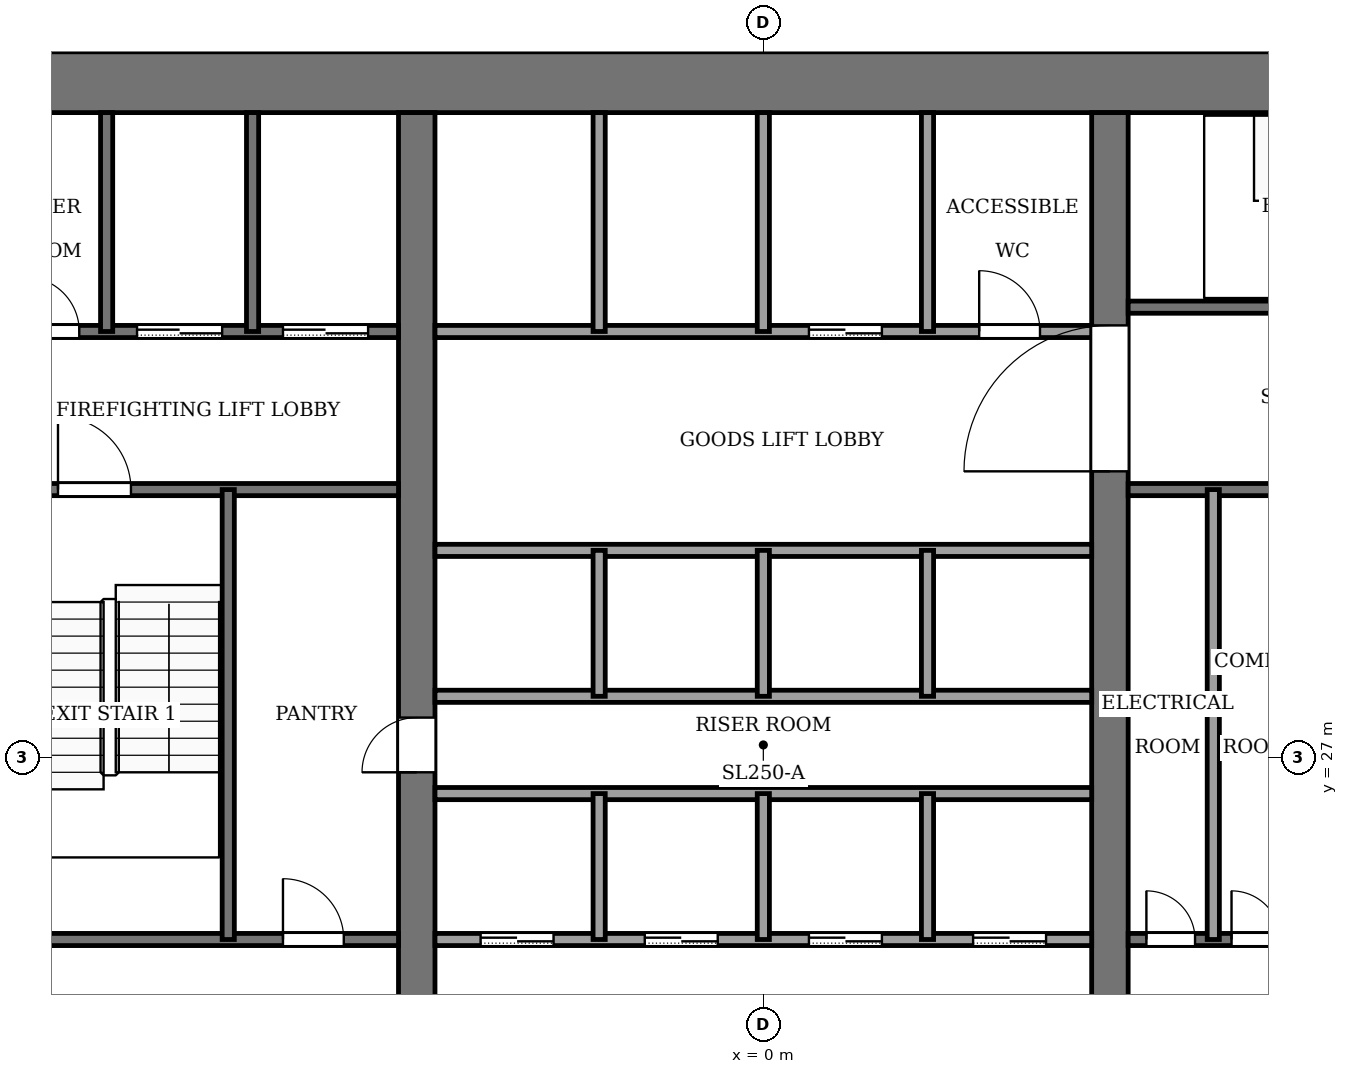
"""IFC4 building model, lengths in metres.
Left out: names, types, materials, properties, quantities, classifications, styles, units other than length and angle.
Written with IfcOpenShell. Run it as: python <this file> out.ifc"""

import sys

from ifc_helpers import new_model, si_unit, direction, frame, frame_2d, origin, place, context, subcontext, project, spatial, rectangle, extrude, element, fill, save


model = new_model("IFC4")
c1 = context("Model", 3, precision=1e-05, world=origin(), true_north=direction((0.0, 1.0)))
c2 = subcontext(c1, "Body", "Model", "MODEL_VIEW")
j1 = project(units=[si_unit("LENGTHUNIT", "METRE"), si_unit("PLANEANGLEUNIT", "RADIAN")], contexts=[c1])
p1 = place(None, origin())
s1 = spatial("IfcSite", under=j1, at=p1, CompositionType="ELEMENT")
p2 = place(p1, origin())
s2 = spatial("IfcBuilding", under=s1, at=p2, CompositionType="ELEMENT")
p3 = place(p2, frame((0.0, 0.0, 142.0)))
s3 = spatial("IfcBuildingStorey", under=s2, at=p3, CompositionType="ELEMENT", Elevation=142.0)
p4 = place(p3, frame((-13.6, 38.1, -0.13), z_axis=(0.0, 0.0, 1.0), x_axis=(1.0, 0.0, 0.0)))
e1 = element("IfcWall", 1, at=p4, inside=s3, PredefinedType="SHEAR", context=c2, shape_type="SweptSolid", body=[
    extrude(rectangle(XDim=27.2, YDim=1.0, at=frame_2d((13.6, 0.0))), origin(), (0.0, 0.0, 1.0), 4.0),
])
p5 = place(p3, frame((-5.7, 18.4, -0.13), z_axis=(0.0, 0.0, 1.0), x_axis=(0.0, 1.0, 0.0)))
e2 = element("IfcWall", 2, at=p5, inside=s3, PredefinedType="SHEAR", context=c2, shape_type="SweptSolid", body=[
    extrude(rectangle(XDim=19.2, YDim=0.6, at=frame_2d((9.6, 0.0))), origin(), (0.0, 0.0, 1.0), 4.0),
])
p6 = place(p5, frame((8.35, 0.0, 0.13)))
e3 = element("IfcOpeningElement", 3, at=p6, cuts=e2, PredefinedType="OPENING", context=c2, shape_type="SweptSolid", body=[
    extrude(rectangle(XDim=0.9, YDim=2.1, at=frame_2d((0.45, 1.05))), frame((0.0, 0.31, 0.0), z_axis=(0.0, -1.0, 0.0), x_axis=(1.0, 0.0, 0.0)), (0.0, 0.0, 1.0), 0.62),
])
p7 = place(p3, frame((5.7, 18.4, -0.13), z_axis=(0.0, 0.0, 1.0), x_axis=(0.0, 1.0, 0.0)))
e4 = element("IfcWall", 4, at=p7, inside=s3, PredefinedType="SHEAR", context=c2, shape_type="SweptSolid", body=[
    extrude(rectangle(XDim=19.2, YDim=0.6, at=frame_2d((9.6, 0.0))), origin(), (0.0, 0.0, 1.0), 4.0),
])
p8 = place(p7, frame((13.3, 0.0, 0.13)))
e5 = element("IfcOpeningElement", 5, at=p8, cuts=e4, PredefinedType="OPENING", context=c2, shape_type="SweptSolid", body=[
    extrude(rectangle(XDim=2.4, YDim=2.4, at=frame_2d((1.2, 1.2))), frame((0.0, 0.31, 0.0), z_axis=(0.0, -1.0, 0.0), x_axis=(1.0, 0.0, 0.0)), (0.0, 0.0, 1.0), 0.62),
])
p9 = place(p3, frame((-12.6, 24.0, 0.0), z_axis=(0.0, 0.0, 1.0), x_axis=(1.0, 0.0, 0.0)))
e6 = element("IfcWall", 6, at=p9, inside=s3, PredefinedType="PARTITIONING", context=c2, shape_type="SweptSolid", body=[
    extrude(rectangle(XDim=6.6, YDim=0.2, at=frame_2d((3.3, 0.0))), origin(), (0.0, 0.0, 1.0), 3.87),
])
p10 = place(p9, frame((4.7, 0.0, 0.0)))
e7 = element("IfcOpeningElement", 7, at=p10, cuts=e6, PredefinedType="OPENING", context=c2, shape_type="SweptSolid", body=[
    extrude(rectangle(XDim=1.0, YDim=2.1, at=frame_2d((0.5, 1.05))), frame((0.0, 0.11, 0.0), z_axis=(0.0, -1.0, 0.0), x_axis=(1.0, 0.0, 0.0)), (0.0, 0.0, 1.0), 0.22),
])
p11 = place(p3, frame((-5.4, 24.0, 0.0), z_axis=(0.0, 0.0, 1.0), x_axis=(1.0, 0.0, 0.0)))
e8 = element("IfcWall", 8, at=p11, inside=s3, PredefinedType="PARTITIONING", context=c2, shape_type="SweptSolid", body=[
    extrude(rectangle(XDim=10.8, YDim=0.2, at=frame_2d((5.4, 0.0))), origin(), (0.0, 0.0, 1.0), 3.87),
])
p12 = place(p11, frame((0.75, 0.0, 0.0)))
e9 = element("IfcOpeningElement", 9, at=p12, cuts=e8, PredefinedType="OPENING", context=c2, shape_type="SweptSolid", body=[
    extrude(rectangle(XDim=1.2, YDim=2.2, at=frame_2d((0.6, 1.1))), frame((0.0, 0.11, 0.0), z_axis=(0.0, -1.0, 0.0), x_axis=(1.0, 0.0, 0.0)), (0.0, 0.0, 1.0), 0.22),
])
p13 = place(p11, frame((3.45, 0.0, 0.0)))
e10 = element("IfcOpeningElement", 10, at=p13, cuts=e8, PredefinedType="OPENING", context=c2, shape_type="SweptSolid", body=[
    extrude(rectangle(XDim=1.2, YDim=2.2, at=frame_2d((0.6, 1.1))), frame((0.0, 0.11, 0.0), z_axis=(0.0, -1.0, 0.0), x_axis=(1.0, 0.0, 0.0)), (0.0, 0.0, 1.0), 0.22),
])
p14 = place(p11, frame((6.15, 0.0, 0.0)))
e11 = element("IfcOpeningElement", 11, at=p14, cuts=e8, PredefinedType="OPENING", context=c2, shape_type="SweptSolid", body=[
    extrude(rectangle(XDim=1.2, YDim=2.2, at=frame_2d((0.6, 1.1))), frame((0.0, 0.11, 0.0), z_axis=(0.0, -1.0, 0.0), x_axis=(1.0, 0.0, 0.0)), (0.0, 0.0, 1.0), 0.22),
])
p15 = place(p11, frame((8.85, 0.0, 0.0)))
e12 = element("IfcOpeningElement", 12, at=p15, cuts=e8, PredefinedType="OPENING", context=c2, shape_type="SweptSolid", body=[
    extrude(rectangle(XDim=1.2, YDim=2.2, at=frame_2d((0.6, 1.1))), frame((0.0, 0.11, 0.0), z_axis=(0.0, -1.0, 0.0), x_axis=(1.0, 0.0, 0.0)), (0.0, 0.0, 1.0), 0.22),
])
p16 = place(p3, frame((6.0, 24.0, 0.0), z_axis=(0.0, 0.0, 1.0), x_axis=(1.0, 0.0, 0.0)))
e13 = element("IfcWall", 13, at=p16, inside=s3, PredefinedType="PARTITIONING", context=c2, shape_type="SweptSolid", body=[
    extrude(rectangle(XDim=6.6, YDim=0.2, at=frame_2d((3.3, 0.0))), origin(), (0.0, 0.0, 1.0), 3.87),
])
p17 = place(p16, frame((0.3, 0.0, 0.0)))
e14 = element("IfcOpeningElement", 14, at=p17, cuts=e13, PredefinedType="OPENING", context=c2, shape_type="SweptSolid", body=[
    extrude(rectangle(XDim=0.8, YDim=2.1, at=frame_2d((0.4, 1.05))), frame((0.0, 0.11, 0.0), z_axis=(0.0, -1.0, 0.0), x_axis=(1.0, 0.0, 0.0)), (0.0, 0.0, 1.0), 0.22),
])
p18 = place(p16, frame((1.7, 0.0, 0.0)))
e15 = element("IfcOpeningElement", 15, at=p18, cuts=e13, PredefinedType="OPENING", context=c2, shape_type="SweptSolid", body=[
    extrude(rectangle(XDim=0.8, YDim=2.1, at=frame_2d((0.4, 1.05))), frame((0.0, 0.11, 0.0), z_axis=(0.0, -1.0, 0.0), x_axis=(1.0, 0.0, 0.0)), (0.0, 0.0, 1.0), 0.22),
])
p19 = place(p16, frame((4.4, 0.0, 0.0)))
e16 = element("IfcOpeningElement", 16, at=p19, cuts=e13, PredefinedType="OPENING", context=c2, shape_type="SweptSolid", body=[
    extrude(rectangle(XDim=1.2, YDim=2.2, at=frame_2d((0.6, 1.1))), frame((0.0, 0.11, 0.0), z_axis=(0.0, -1.0, 0.0), x_axis=(1.0, 0.0, 0.0)), (0.0, 0.0, 1.0), 0.22),
])
for number, where, z_axis, x_axis in (
    (17, (-5.4, 26.4, 0.0), (0.0, 0.0, 1.0), (1.0, 0.0, 0.0)),
    (18, (-5.4, 28.0, 0.0), (0.0, 0.0, 1.0), (1.0, 0.0, 0.0)),
    (19, (-5.4, 30.4, 0.0), (0.0, 0.0, 1.0), (1.0, 0.0, 0.0)),
):
    element("IfcWall", number, at=place(p3, frame(where, z_axis=z_axis, x_axis=x_axis)), inside=s3, PredefinedType="PARTITIONING", context=c2, shape_type="SweptSolid", body=[
        extrude(rectangle(XDim=10.8, YDim=0.2, at=frame_2d((5.4, 0.0))), origin(), (0.0, 0.0, 1.0), 3.87),
    ])
p20 = place(p3, frame((-12.6, 31.4, 0.0), z_axis=(0.0, 0.0, 1.0), x_axis=(1.0, 0.0, 0.0)))
e20 = element("IfcWall", 20, at=p20, inside=s3, PredefinedType="PARTITIONING", context=c2, shape_type="SweptSolid", body=[
    extrude(rectangle(XDim=6.6, YDim=0.2, at=frame_2d((3.3, 0.0))), origin(), (0.0, 0.0, 1.0), 3.87),
])
p21 = place(p20, frame((1.0, 0.0, 0.0)))
e21 = element("IfcOpeningElement", 21, at=p21, cuts=e20, PredefinedType="OPENING", context=c2, shape_type="SweptSolid", body=[
    extrude(rectangle(XDim=1.2, YDim=2.2, at=frame_2d((0.6, 1.1))), frame((0.0, 0.11, 0.0), z_axis=(0.0, -1.0, 0.0), x_axis=(1.0, 0.0, 0.0)), (0.0, 0.0, 1.0), 0.22),
])
p22 = place(p3, frame((6.0, 31.4, 0.0), z_axis=(0.0, 0.0, 1.0), x_axis=(1.0, 0.0, 0.0)))
e22 = element("IfcWall", 22, at=p22, inside=s3, PredefinedType="PARTITIONING", context=c2, shape_type="SweptSolid", body=[
    extrude(rectangle(XDim=6.6, YDim=0.2, at=frame_2d((3.3, 0.0))), origin(), (0.0, 0.0, 1.0), 3.87),
])
p23 = place(p3, frame((-12.6, 34.0, 0.0), z_axis=(0.0, 0.0, 1.0), x_axis=(1.0, 0.0, 0.0)))
e23 = element("IfcWall", 23, at=p23, inside=s3, PredefinedType="PARTITIONING", context=c2, shape_type="SweptSolid", body=[
    extrude(rectangle(XDim=6.6, YDim=0.2, at=frame_2d((3.3, 0.0))), origin(), (0.0, 0.0, 1.0), 3.87),
])
p24 = place(p23, frame((4.7, 0.0, 0.0)))
e24 = element("IfcOpeningElement", 24, at=p24, cuts=e23, PredefinedType="OPENING", context=c2, shape_type="SweptSolid", body=[
    extrude(rectangle(XDim=1.4, YDim=2.2, at=frame_2d((0.7, 1.1))), frame((0.0, 0.11, 0.0), z_axis=(0.0, -1.0, 0.0), x_axis=(1.0, 0.0, 0.0)), (0.0, 0.0, 1.0), 0.22),
])
p25 = place(p23, frame((2.3, 0.0, 0.0)))
e25 = element("IfcOpeningElement", 25, at=p25, cuts=e23, PredefinedType="OPENING", context=c2, shape_type="SweptSolid", body=[
    extrude(rectangle(XDim=1.4, YDim=2.2, at=frame_2d((0.7, 1.1))), frame((0.0, 0.11, 0.0), z_axis=(0.0, -1.0, 0.0), x_axis=(1.0, 0.0, 0.0)), (0.0, 0.0, 1.0), 0.22),
])
p26 = place(p23, frame((0.45, 0.0, 0.0)))
e26 = element("IfcOpeningElement", 26, at=p26, cuts=e23, PredefinedType="OPENING", context=c2, shape_type="SweptSolid", body=[
    extrude(rectangle(XDim=0.9, YDim=2.1, at=frame_2d((0.45, 1.05))), frame((0.0, 0.11, 0.0), z_axis=(0.0, -1.0, 0.0), x_axis=(1.0, 0.0, 0.0)), (0.0, 0.0, 1.0), 0.22),
])
p27 = place(p3, frame((-5.4, 34.0, 0.0), z_axis=(0.0, 0.0, 1.0), x_axis=(1.0, 0.0, 0.0)))
e27 = element("IfcWall", 27, at=p27, inside=s3, PredefinedType="PARTITIONING", context=c2, shape_type="SweptSolid", body=[
    extrude(rectangle(XDim=10.8, YDim=0.2, at=frame_2d((5.4, 0.0))), origin(), (0.0, 0.0, 1.0), 3.87),
])
p28 = place(p27, frame((6.15, 0.0, 0.0)))
e28 = element("IfcOpeningElement", 28, at=p28, cuts=e27, PredefinedType="OPENING", context=c2, shape_type="SweptSolid", body=[
    extrude(rectangle(XDim=1.2, YDim=2.2, at=frame_2d((0.6, 1.1))), frame((0.0, 0.11, 0.0), z_axis=(0.0, -1.0, 0.0), x_axis=(1.0, 0.0, 0.0)), (0.0, 0.0, 1.0), 0.22),
])
p29 = place(p27, frame((8.95, 0.0, 0.0)))
e29 = element("IfcOpeningElement", 29, at=p29, cuts=e27, PredefinedType="OPENING", context=c2, shape_type="SweptSolid", body=[
    extrude(rectangle(XDim=1.0, YDim=2.1, at=frame_2d((0.5, 1.05))), frame((0.0, 0.11, 0.0), z_axis=(0.0, -1.0, 0.0), x_axis=(1.0, 0.0, 0.0)), (0.0, 0.0, 1.0), 0.22),
])
p30 = place(p3, frame((6.0, 34.4, 0.0), z_axis=(0.0, 0.0, 1.0), x_axis=(1.0, 0.0, 0.0)))
e30 = element("IfcWall", 30, at=p30, inside=s3, PredefinedType="PARTITIONING", context=c2, shape_type="SweptSolid", body=[
    extrude(rectangle(XDim=6.6, YDim=0.2, at=frame_2d((3.3, 0.0))), origin(), (0.0, 0.0, 1.0), 3.87),
])
p31 = place(p30, frame((4.8, 0.0, 0.0)))
e31 = element("IfcOpeningElement", 31, at=p31, cuts=e30, PredefinedType="OPENING", context=c2, shape_type="SweptSolid", body=[
    extrude(rectangle(XDim=1.2, YDim=2.2, at=frame_2d((0.6, 1.1))), frame((0.0, 0.11, 0.0), z_axis=(0.0, -1.0, 0.0), x_axis=(1.0, 0.0, 0.0)), (0.0, 0.0, 1.0), 0.22),
])
p32 = place(p3, frame((-10.8, 34.0, 0.0), z_axis=(0.0, 0.0, 1.0), x_axis=(0.0, 1.0, 0.0)))
e32 = element("IfcWall", 32, at=p32, inside=s3, PredefinedType="PARTITIONING", context=c2, shape_type="SweptSolid", body=[
    extrude(rectangle(XDim=3.6, YDim=0.2, at=frame_2d((1.8, 0.0))), origin(), (0.0, 0.0, 1.0), 3.87),
])
p33 = place(p3, frame((-8.8, 24.0, 0.0), z_axis=(0.0, 0.0, 1.0), x_axis=(0.0, 1.0, 0.0)))
e33 = element("IfcWall", 33, at=p33, inside=s3, PredefinedType="PARTITIONING", context=c2, shape_type="SweptSolid", body=[
    extrude(rectangle(XDim=7.4, YDim=0.2, at=frame_2d((3.7, 0.0))), origin(), (0.0, 0.0, 1.0), 3.87),
])
p34 = place(p3, frame((-8.4, 34.0, 0.0), z_axis=(0.0, 0.0, 1.0), x_axis=(0.0, 1.0, 0.0)))
e34 = element("IfcWall", 34, at=p34, inside=s3, PredefinedType="PARTITIONING", context=c2, shape_type="SweptSolid", body=[
    extrude(rectangle(XDim=3.6, YDim=0.2, at=frame_2d((1.8, 0.0))), origin(), (0.0, 0.0, 1.0), 3.87),
])
for number, where, z_axis, x_axis in (
    (35, (-2.7, 24.0, 0.0), (0.0, 0.0, 1.0), (0.0, 1.0, 0.0)),
    (36, (-2.7, 28.0, 0.0), (0.0, 0.0, 1.0), (0.0, 1.0, 0.0)),
):
    element("IfcWall", number, at=place(p3, frame(where, z_axis=z_axis, x_axis=x_axis)), inside=s3, PredefinedType="PARTITIONING", context=c2, shape_type="SweptSolid", body=[
        extrude(rectangle(XDim=2.4, YDim=0.2, at=frame_2d((1.2, 0.0))), origin(), (0.0, 0.0, 1.0), 3.87),
    ])
p35 = place(p3, frame((-2.7, 34.0, 0.0), z_axis=(0.0, 0.0, 1.0), x_axis=(0.0, 1.0, 0.0)))
e37 = element("IfcWall", 37, at=p35, inside=s3, PredefinedType="PARTITIONING", context=c2, shape_type="SweptSolid", body=[
    extrude(rectangle(XDim=3.6, YDim=0.2, at=frame_2d((1.8, 0.0))), origin(), (0.0, 0.0, 1.0), 3.87),
])
for number, where, z_axis, x_axis in (
    (38, (0.0, 24.0, 0.0), (0.0, 0.0, 1.0), (0.0, 1.0, 0.0)),
    (39, (0.0, 28.0, 0.0), (0.0, 0.0, 1.0), (0.0, 1.0, 0.0)),
):
    element("IfcWall", number, at=place(p3, frame(where, z_axis=z_axis, x_axis=x_axis)), inside=s3, PredefinedType="PARTITIONING", context=c2, shape_type="SweptSolid", body=[
        extrude(rectangle(XDim=2.4, YDim=0.2, at=frame_2d((1.2, 0.0))), origin(), (0.0, 0.0, 1.0), 3.87),
    ])
p36 = place(p3, frame((0.0, 34.0, 0.0), z_axis=(0.0, 0.0, 1.0), x_axis=(0.0, 1.0, 0.0)))
e40 = element("IfcWall", 40, at=p36, inside=s3, PredefinedType="PARTITIONING", context=c2, shape_type="SweptSolid", body=[
    extrude(rectangle(XDim=3.6, YDim=0.2, at=frame_2d((1.8, 0.0))), origin(), (0.0, 0.0, 1.0), 3.87),
])
for number, where, z_axis, x_axis in (
    (41, (2.7, 24.0, 0.0), (0.0, 0.0, 1.0), (0.0, 1.0, 0.0)),
    (42, (2.7, 28.0, 0.0), (0.0, 0.0, 1.0), (0.0, 1.0, 0.0)),
):
    element("IfcWall", number, at=place(p3, frame(where, z_axis=z_axis, x_axis=x_axis)), inside=s3, PredefinedType="PARTITIONING", context=c2, shape_type="SweptSolid", body=[
        extrude(rectangle(XDim=2.4, YDim=0.2, at=frame_2d((1.2, 0.0))), origin(), (0.0, 0.0, 1.0), 3.87),
    ])
p37 = place(p3, frame((2.7, 34.0, 0.0), z_axis=(0.0, 0.0, 1.0), x_axis=(0.0, 1.0, 0.0)))
e43 = element("IfcWall", 43, at=p37, inside=s3, PredefinedType="PARTITIONING", context=c2, shape_type="SweptSolid", body=[
    extrude(rectangle(XDim=3.6, YDim=0.2, at=frame_2d((1.8, 0.0))), origin(), (0.0, 0.0, 1.0), 3.87),
])
p38 = place(p3, frame((7.4, 24.0, 0.0), z_axis=(0.0, 0.0, 1.0), x_axis=(0.0, 1.0, 0.0)))
e44 = element("IfcWall", 44, at=p38, inside=s3, PredefinedType="PARTITIONING", context=c2, shape_type="SweptSolid", body=[
    extrude(rectangle(XDim=7.4, YDim=0.2, at=frame_2d((3.7, 0.0))), origin(), (0.0, 0.0, 1.0), 3.87),
])
p39 = place(p12, origin())
e45 = element("IfcDoor", 45, at=p39, inside=s3, OperationType="SLIDING_TO_LEFT", PredefinedType="DOOR", context=c2, shape_type="SweptSolid", body=[
    extrude(rectangle(XDim=1.2, YDim=2.2, at=frame_2d((0.6, 1.1))), frame((0.0, 0.025, 0.0), z_axis=(0.0, -1.0, 0.0), x_axis=(1.0, 0.0, 0.0)), (0.0, 0.0, 1.0), 0.05),
])
fill(e9, e45)
p40 = place(p13, origin())
e46 = element("IfcDoor", 46, at=p40, inside=s3, OperationType="SLIDING_TO_LEFT", PredefinedType="DOOR", context=c2, shape_type="SweptSolid", body=[
    extrude(rectangle(XDim=1.2, YDim=2.2, at=frame_2d((0.6, 1.1))), frame((0.0, 0.025, 0.0), z_axis=(0.0, -1.0, 0.0), x_axis=(1.0, 0.0, 0.0)), (0.0, 0.0, 1.0), 0.05),
])
fill(e10, e46)
p41 = place(p14, origin())
e47 = element("IfcDoor", 47, at=p41, inside=s3, OperationType="SLIDING_TO_LEFT", PredefinedType="DOOR", context=c2, shape_type="SweptSolid", body=[
    extrude(rectangle(XDim=1.2, YDim=2.2, at=frame_2d((0.6, 1.1))), frame((0.0, 0.025, 0.0), z_axis=(0.0, -1.0, 0.0), x_axis=(1.0, 0.0, 0.0)), (0.0, 0.0, 1.0), 0.05),
])
fill(e11, e47)
p42 = place(p15, origin())
e48 = element("IfcDoor", 48, at=p42, inside=s3, OperationType="SLIDING_TO_LEFT", PredefinedType="DOOR", context=c2, shape_type="SweptSolid", body=[
    extrude(rectangle(XDim=1.2, YDim=2.2, at=frame_2d((0.6, 1.1))), frame((0.0, 0.025, 0.0), z_axis=(0.0, -1.0, 0.0), x_axis=(1.0, 0.0, 0.0)), (0.0, 0.0, 1.0), 0.05),
])
fill(e12, e48)
p43 = place(p28, origin())
e49 = element("IfcDoor", 49, at=p43, inside=s3, OperationType="SLIDING_TO_LEFT", PredefinedType="DOOR", context=c2, shape_type="SweptSolid", body=[
    extrude(rectangle(XDim=1.2, YDim=2.2, at=frame_2d((0.6, 1.1))), frame((0.0, 0.025, 0.0), z_axis=(0.0, -1.0, 0.0), x_axis=(1.0, 0.0, 0.0)), (0.0, 0.0, 1.0), 0.05),
])
fill(e28, e49)
p44 = place(p24, origin())
e50 = element("IfcDoor", 50, at=p44, inside=s3, OperationType="SLIDING_TO_LEFT", PredefinedType="DOOR", context=c2, shape_type="SweptSolid", body=[
    extrude(rectangle(XDim=1.4, YDim=2.2, at=frame_2d((0.7, 1.1))), frame((0.0, 0.025, 0.0), z_axis=(0.0, -1.0, 0.0), x_axis=(1.0, 0.0, 0.0)), (0.0, 0.0, 1.0), 0.05),
])
fill(e24, e50)
p45 = place(p25, origin())
e51 = element("IfcDoor", 51, at=p45, inside=s3, OperationType="SLIDING_TO_LEFT", PredefinedType="DOOR", context=c2, shape_type="SweptSolid", body=[
    extrude(rectangle(XDim=1.4, YDim=2.2, at=frame_2d((0.7, 1.1))), frame((0.0, 0.025, 0.0), z_axis=(0.0, -1.0, 0.0), x_axis=(1.0, 0.0, 0.0)), (0.0, 0.0, 1.0), 0.05),
])
fill(e25, e51)
p46 = place(p26, origin())
e52 = element("IfcDoor", 52, at=p46, inside=s3, OperationType="SINGLE_SWING_RIGHT", PredefinedType="DOOR", context=c2, shape_type="SweptSolid", body=[
    extrude(rectangle(XDim=0.9, YDim=2.1, at=frame_2d((0.45, 1.05))), frame((0.0, 0.025, 0.0), z_axis=(0.0, -1.0, 0.0), x_axis=(1.0, 0.0, 0.0)), (0.0, 0.0, 1.0), 0.05),
])
fill(e26, e52)
p47 = place(p10, origin())
e53 = element("IfcDoor", 53, at=p47, inside=s3, OperationType="SINGLE_SWING_RIGHT", PredefinedType="DOOR", context=c2, shape_type="SweptSolid", body=[
    extrude(rectangle(XDim=1.0, YDim=2.1, at=frame_2d((0.5, 1.05))), frame((0.0, 0.025, 0.0), z_axis=(0.0, -1.0, 0.0), x_axis=(1.0, 0.0, 0.0)), (0.0, 0.0, 1.0), 0.05),
])
fill(e7, e53)
p48 = place(p17, origin())
e54 = element("IfcDoor", 54, at=p48, inside=s3, OperationType="SINGLE_SWING_RIGHT", PredefinedType="DOOR", context=c2, shape_type="SweptSolid", body=[
    extrude(rectangle(XDim=0.8, YDim=2.1, at=frame_2d((0.4, 1.05))), frame((0.0, 0.025, 0.0), z_axis=(0.0, -1.0, 0.0), x_axis=(1.0, 0.0, 0.0)), (0.0, 0.0, 1.0), 0.05),
])
fill(e14, e54)
p49 = place(p18, origin())
e55 = element("IfcDoor", 55, at=p49, inside=s3, OperationType="SINGLE_SWING_LEFT", PredefinedType="DOOR", context=c2, shape_type="SweptSolid", body=[
    extrude(rectangle(XDim=0.8, YDim=2.1, at=frame_2d((0.4, 1.05))), frame((0.0, 0.025, 0.0), z_axis=(0.0, -1.0, 0.0), x_axis=(1.0, 0.0, 0.0)), (0.0, 0.0, 1.0), 0.05),
])
fill(e15, e55)
p50 = place(p29, origin())
e56 = element("IfcDoor", 56, at=p50, inside=s3, OperationType="SINGLE_SWING_LEFT", PredefinedType="DOOR", context=c2, shape_type="SweptSolid", body=[
    extrude(rectangle(XDim=1.0, YDim=2.1, at=frame_2d((0.5, 1.05))), frame((0.0, 0.025, 0.0), z_axis=(0.0, -1.0, 0.0), x_axis=(1.0, 0.0, 0.0)), (0.0, 0.0, 1.0), 0.05),
])
fill(e29, e56)
p51 = place(p6, origin())
e57 = element("IfcDoor", 57, at=p51, inside=s3, OperationType="SINGLE_SWING_LEFT", PredefinedType="DOOR", context=c2, shape_type="SweptSolid", body=[
    extrude(rectangle(XDim=0.9, YDim=2.1, at=frame_2d((0.45, 1.05))), frame((0.0, 0.025, 0.0), z_axis=(0.0, -1.0, 0.0), x_axis=(1.0, 0.0, 0.0)), (0.0, 0.0, 1.0), 0.05),
])
fill(e3, e57)
p52 = place(p21, origin())
e58 = element("IfcDoor", 58, at=p52, inside=s3, OperationType="SINGLE_SWING_LEFT", PredefinedType="DOOR", context=c2, shape_type="SweptSolid", body=[
    extrude(rectangle(XDim=1.2, YDim=2.2, at=frame_2d((0.6, 1.1))), frame((0.0, 0.025, 0.0), z_axis=(0.0, -1.0, 0.0), x_axis=(1.0, 0.0, 0.0)), (0.0, 0.0, 1.0), 0.05),
])
fill(e21, e58)
p53 = place(p8, origin())
e59 = element("IfcDoor", 59, at=p53, inside=s3, OperationType="DOUBLE_DOOR_SINGLE_SWING", PredefinedType="DOOR", context=c2, shape_type="SweptSolid", body=[
    extrude(rectangle(XDim=2.4, YDim=2.4, at=frame_2d((1.2, 1.2))), frame((0.0, 0.025, 0.0), z_axis=(0.0, -1.0, 0.0), x_axis=(1.0, 0.0, 0.0)), (0.0, 0.0, 1.0), 0.05),
])
fill(e5, e59)
save(model, sys.argv[1])
